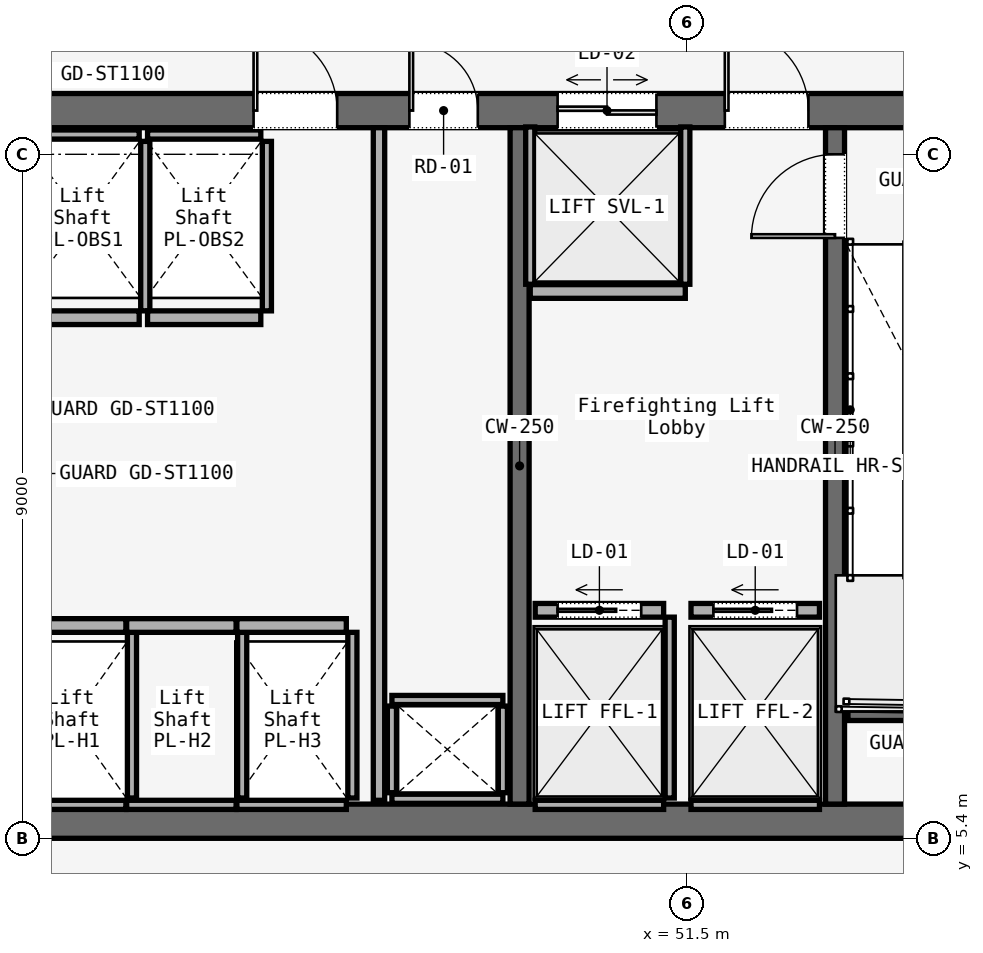
"""IFC4 building model, lengths in metres.
Left out: names, types, materials, properties, quantities, classifications, styles, units other than length and angle.
Written with IfcOpenShell. Run it as: python <this file> out.ifc"""

import sys

from ifc_helpers import new_model, si_unit, direction, frame, frame_2d, origin, place, context, subcontext, project, spatial, rectangle, extrude, element, fill, save


model = new_model("IFC4")
c1 = context("Model", 3, precision=1e-05, world=origin(), true_north=direction((0.0, 1.0)))
c2 = subcontext(c1, "Body", "Model", "MODEL_VIEW")
j1 = project(units=[si_unit("LENGTHUNIT", "METRE"), si_unit("PLANEANGLEUNIT", "RADIAN")], contexts=[c1])
p1 = place(None, origin())
s1 = spatial("IfcSite", under=j1, at=p1, CompositionType="ELEMENT")
p2 = place(p1, origin())
s2 = spatial("IfcBuilding", under=s1, at=p2, CompositionType="ELEMENT")
p3 = place(p2, frame((0.0, 0.0, 6.0)))
s3 = spatial("IfcBuildingStorey", under=s2, at=p3, CompositionType="ELEMENT", Elevation=6.0)
p4 = place(p3, frame((26.45, 14.975, 0.0), z_axis=(0.0, 0.0, 1.0), x_axis=(1.0, 0.0, 0.0)))
e1 = element("IfcWall", 1, at=p4, inside=s3, PredefinedType="SOLIDWALL", context=c2, shape_type="SweptSolid", body=[
    extrude(rectangle(XDim=31.1, YDim=0.45, at=frame_2d((15.55, 0.0))), origin(), (0.0, 0.0, 1.0), 5.7),
])
p5 = place(p4, frame((1.65, 0.0, 0.0)))
e2 = element("IfcOpeningElement", 2, at=p5, cuts=e1, PredefinedType="OPENING", context=c2, shape_type="SweptSolid", body=[
    extrude(rectangle(XDim=1.1, YDim=2.2, at=frame_2d((0.55, 1.1))), frame((0.0, 0.225, 0.0), z_axis=(0.0, -1.0, 0.0), x_axis=(1.0, 0.0, 0.0)), (0.0, 0.0, 1.0), 0.45),
])
p6 = place(p4, frame((13.65, 0.0, 0.0)))
e3 = element("IfcOpeningElement", 3, at=p6, cuts=e1, PredefinedType="OPENING", context=c2, shape_type="SweptSolid", body=[
    extrude(rectangle(XDim=1.1, YDim=2.2, at=frame_2d((0.55, 1.1))), frame((0.0, 0.225, 0.0), z_axis=(0.0, -1.0, 0.0), x_axis=(1.0, 0.0, 0.0)), (0.0, 0.0, 1.0), 0.45),
])
p7 = place(p4, frame((25.55, 0.0, 0.0)))
e4 = element("IfcOpeningElement", 4, at=p7, cuts=e1, PredefinedType="OPENING", context=c2, shape_type="SweptSolid", body=[
    extrude(rectangle(XDim=1.1, YDim=2.2, at=frame_2d((0.55, 1.1))), frame((0.0, 0.225, 0.0), z_axis=(0.0, -1.0, 0.0), x_axis=(1.0, 0.0, 0.0)), (0.0, 0.0, 1.0), 0.45),
])
p8 = place(p4, frame((10.7, 0.0, 0.0)))
e5 = element("IfcOpeningElement", 5, at=p8, cuts=e1, PredefinedType="OPENING", context=c2, shape_type="SweptSolid", body=[
    extrude(rectangle(XDim=1.4, YDim=2.2, at=frame_2d((0.7, 1.1))), frame((0.0, 0.225, 0.0), z_axis=(0.0, -1.0, 0.0), x_axis=(1.0, 0.0, 0.0)), (0.0, 0.0, 1.0), 0.45),
])
p9 = place(p4, frame((19.35, 0.0, 0.0)))
e6 = element("IfcOpeningElement", 6, at=p9, cuts=e1, PredefinedType="OPENING", context=c2, shape_type="SweptSolid", body=[
    extrude(rectangle(XDim=1.1, YDim=2.2, at=frame_2d((0.55, 1.1))), frame((0.0, 0.225, 0.0), z_axis=(0.0, -1.0, 0.0), x_axis=(1.0, 0.0, 0.0)), (0.0, 0.0, 1.0), 0.45),
])
p10 = place(p4, frame((21.4, 0.0, 0.0)))
e7 = element("IfcOpeningElement", 7, at=p10, cuts=e1, PredefinedType="OPENING", context=c2, shape_type="SweptSolid", body=[
    extrude(rectangle(XDim=0.9, YDim=2.1, at=frame_2d((0.45, 1.05))), frame((0.0, 0.225, 0.0), z_axis=(0.0, -1.0, 0.0), x_axis=(1.0, 0.0, 0.0)), (0.0, 0.0, 1.0), 0.45),
])
p11 = place(p4, frame((23.35, 0.0, 0.0)))
e8 = element("IfcOpeningElement", 8, at=p11, cuts=e1, PredefinedType="OPENING", context=c2, shape_type="SweptSolid", body=[
    extrude(rectangle(XDim=1.3, YDim=2.3, at=frame_2d((0.65, 1.15))), frame((0.0, 0.225, 0.0), z_axis=(0.0, -1.0, 0.0), x_axis=(1.0, 0.0, 0.0)), (0.0, 0.0, 1.0), 0.45),
])
p12 = place(p3, frame((26.45, 5.625, 0.0), z_axis=(0.0, 0.0, 1.0), x_axis=(1.0, 0.0, 0.0)))
e9 = element("IfcWall", 9, at=p12, inside=s3, PredefinedType="SOLIDWALL", context=c2, shape_type="SweptSolid", body=[
    extrude(rectangle(XDim=31.1, YDim=0.45, at=frame_2d((15.55, 0.0))), origin(), (0.0, 0.0, 1.0), 5.7),
])
p13 = place(p3, frame((49.3, 5.85, 0.0), z_axis=(0.0, 0.0, 1.0), x_axis=(0.0, 1.0, 0.0)))
e10 = element("IfcWall", 10, at=p13, inside=s3, PredefinedType="SOLIDWALL", context=c2, shape_type="SweptSolid", body=[
    extrude(rectangle(XDim=8.9, YDim=0.25, at=frame_2d((4.45, 0.0))), origin(), (0.0, 0.0, 1.0), 5.7),
])
p14 = place(p3, frame((53.45, 5.85, 0.0), z_axis=(0.0, 0.0, 1.0), x_axis=(0.0, 1.0, 0.0)))
e11 = element("IfcWall", 11, at=p14, inside=s3, PredefinedType="SOLIDWALL", context=c2, shape_type="SweptSolid", body=[
    extrude(rectangle(XDim=8.9, YDim=0.25, at=frame_2d((4.45, 0.0))), origin(), (0.0, 0.0, 1.0), 5.7),
])
p15 = place(p14, frame((7.45, 0.0, 0.0)))
e12 = element("IfcOpeningElement", 12, at=p15, cuts=e11, PredefinedType="OPENING", context=c2, shape_type="SweptSolid", body=[
    extrude(rectangle(XDim=1.1, YDim=2.2, at=frame_2d((0.55, 1.1))), frame((0.0, 0.125, 0.0), z_axis=(0.0, -1.0, 0.0), x_axis=(1.0, 0.0, 0.0)), (0.0, 0.0, 1.0), 0.25),
])
p16 = place(p3, frame((53.62, 7.05, 0.0), z_axis=(0.0, 0.0, 1.0), x_axis=(1.0, 0.0, 0.0)))
e13 = element("IfcWall", 13, at=p16, inside=s3, PredefinedType="SOLIDWALL", context=c2, shape_type="SweptSolid", body=[
    extrude(rectangle(XDim=3.115, YDim=0.2, at=frame_2d((1.558, 0.0))), origin(), (0.0, 0.0, 1.0), 6.0),
])
for number, where, z_axis, x_axis in (
    (14, (47.62, 5.92, 0.0), (0.0, 0.0, 1.0), (1.0, 0.0, 0.0)),
    (15, (47.62, 7.22, 0.0), (0.0, 0.0, 1.0), (1.0, 0.0, 0.0)),
):
    element("IfcWall", number, at=place(p3, frame(where, z_axis=z_axis, x_axis=x_axis)), inside=s3, PredefinedType="SOLIDWALL", context=c2, shape_type="SweptSolid", body=[
        extrude(rectangle(XDim=1.46, YDim=0.12, at=frame_2d((0.73, 0.0))), origin(), (0.0, 0.0, 1.0), 4.819),
    ])
for number, where, z_axis, x_axis in (
    (16, (47.62, 6.0, 0.0), (0.0, 0.0, 1.0), (0.0, 1.0, 0.0)),
    (17, (49.08, 6.0, 0.0), (0.0, 0.0, 1.0), (0.0, 1.0, 0.0)),
):
    element("IfcWall", number, at=place(p3, frame(where, z_axis=z_axis, x_axis=x_axis)), inside=s3, PredefinedType="SOLIDWALL", context=c2, shape_type="SweptSolid", body=[
        extrude(rectangle(XDim=1.14, YDim=0.12, at=frame_2d((0.57, 0.0))), origin(), (0.0, 0.0, 1.0), 4.819),
    ])
p17 = place(p3, frame((47.45, 5.9, 0.0), z_axis=(0.0, 0.0, 1.0), x_axis=(0.0, 1.0, 0.0)))
e18 = element("IfcWall", 18, at=p17, inside=s3, PredefinedType="PARTITIONING", context=c2, shape_type="SweptSolid", body=[
    extrude(rectangle(XDim=8.85, YDim=0.15, at=frame_2d((4.425, 0.0))), origin(), (0.0, 0.0, 1.0), 4.819),
])
p18 = place(p3, frame((42.78, 8.2, 0.0), z_axis=(0.0, 0.0, 1.0), x_axis=(1.0, 0.0, 0.0)))
e19 = element("IfcWall", 19, at=p18, inside=s3, PredefinedType="SOLIDWALL", context=c2, shape_type="SweptSolid", body=[
    extrude(rectangle(XDim=1.34, YDim=0.18, at=frame_2d((0.67, 0.0))), origin(), (0.0, 0.0, 1.0), 4.819),
])
p19 = place(p3, frame((42.78, 5.84, 0.0), z_axis=(0.0, 0.0, 1.0), x_axis=(1.0, 0.0, 0.0)))
e20 = element("IfcWall", 20, at=p19, inside=s3, PredefinedType="SOLIDWALL", context=c2, shape_type="SweptSolid", body=[
    extrude(rectangle(XDim=1.34, YDim=0.12, at=frame_2d((0.67, 0.0))), origin(), (0.0, 0.0, 1.0), 4.819),
])
p20 = place(p3, frame((44.2, 5.93, 0.0), z_axis=(0.0, 0.0, 1.0), x_axis=(0.0, 1.0, 0.0)))
e21 = element("IfcWall", 21, at=p20, inside=s3, PredefinedType="SOLIDWALL", context=c2, shape_type="SweptSolid", body=[
    extrude(rectangle(XDim=2.18, YDim=0.12, at=frame_2d((1.09, 0.0))), origin(), (0.0, 0.0, 1.0), 4.819),
])
p21 = place(p3, frame((44.13, 8.2, 0.0), z_axis=(0.0, 0.0, 1.0), x_axis=(1.0, 0.0, 0.0)))
e22 = element("IfcWall", 22, at=p21, inside=s3, PredefinedType="SOLIDWALL", context=c2, shape_type="SweptSolid", body=[
    extrude(rectangle(XDim=1.44, YDim=0.18, at=frame_2d((0.72, 0.0))), origin(), (0.0, 0.0, 1.0), 4.819),
])
p22 = place(p3, frame((44.13, 5.84, 0.0), z_axis=(0.0, 0.0, 1.0), x_axis=(1.0, 0.0, 0.0)))
e23 = element("IfcWall", 23, at=p22, inside=s3, PredefinedType="SOLIDWALL", context=c2, shape_type="SweptSolid", body=[
    extrude(rectangle(XDim=1.44, YDim=0.12, at=frame_2d((0.72, 0.0))), origin(), (0.0, 0.0, 1.0), 4.819),
])
p23 = place(p3, frame((45.65, 5.93, 0.0), z_axis=(0.0, 0.0, 1.0), x_axis=(0.0, 1.0, 0.0)))
e24 = element("IfcWall", 24, at=p23, inside=s3, PredefinedType="SOLIDWALL", context=c2, shape_type="SweptSolid", body=[
    extrude(rectangle(XDim=2.18, YDim=0.12, at=frame_2d((1.09, 0.0))), origin(), (0.0, 0.0, 1.0), 4.819),
])
p24 = place(p3, frame((45.58, 8.2, 0.0), z_axis=(0.0, 0.0, 1.0), x_axis=(1.0, 0.0, 0.0)))
e25 = element("IfcWall", 25, at=p24, inside=s3, PredefinedType="SOLIDWALL", context=c2, shape_type="SweptSolid", body=[
    extrude(rectangle(XDim=1.44, YDim=0.18, at=frame_2d((0.72, 0.0))), origin(), (0.0, 0.0, 1.0), 4.819),
])
p25 = place(p3, frame((45.58, 5.84, 0.0), z_axis=(0.0, 0.0, 1.0), x_axis=(1.0, 0.0, 0.0)))
e26 = element("IfcWall", 26, at=p25, inside=s3, PredefinedType="SOLIDWALL", context=c2, shape_type="SweptSolid", body=[
    extrude(rectangle(XDim=1.44, YDim=0.12, at=frame_2d((0.72, 0.0))), origin(), (0.0, 0.0, 1.0), 4.819),
])
p26 = place(p3, frame((47.1, 5.93, 0.0), z_axis=(0.0, 0.0, 1.0), x_axis=(0.0, 1.0, 0.0)))
e27 = element("IfcWall", 27, at=p26, inside=s3, PredefinedType="SOLIDWALL", context=c2, shape_type="SweptSolid", body=[
    extrude(rectangle(XDim=2.18, YDim=0.12, at=frame_2d((1.09, 0.0))), origin(), (0.0, 0.0, 1.0), 4.819),
])
p27 = place(p3, frame((42.805, 12.25, 0.0), z_axis=(0.0, 0.0, 1.0), x_axis=(1.0, 0.0, 0.0)))
e28 = element("IfcWall", 28, at=p27, inside=s3, PredefinedType="SOLIDWALL", context=c2, shape_type="SweptSolid", body=[
    extrude(rectangle(XDim=1.49, YDim=0.18, at=frame_2d((0.745, 0.0))), origin(), (0.0, 0.0, 1.0), 4.819),
])
p28 = place(p3, frame((42.805, 14.66, 0.0), z_axis=(0.0, 0.0, 1.0), x_axis=(1.0, 0.0, 0.0)))
e29 = element("IfcWall", 29, at=p28, inside=s3, PredefinedType="SOLIDWALL", context=c2, shape_type="SweptSolid", body=[
    extrude(rectangle(XDim=1.49, YDim=0.12, at=frame_2d((0.745, 0.0))), origin(), (0.0, 0.0, 1.0), 4.819),
])
p29 = place(p3, frame((44.375, 12.34, 0.0), z_axis=(0.0, 0.0, 1.0), x_axis=(0.0, 1.0, 0.0)))
e30 = element("IfcWall", 30, at=p29, inside=s3, PredefinedType="SOLIDWALL", context=c2, shape_type="SweptSolid", body=[
    extrude(rectangle(XDim=2.23, YDim=0.12, at=frame_2d((1.115, 0.0))), origin(), (0.0, 0.0, 1.0), 4.819),
])
p30 = place(p3, frame((44.405, 12.25, 0.0), z_axis=(0.0, 0.0, 1.0), x_axis=(1.0, 0.0, 0.0)))
e31 = element("IfcWall", 31, at=p30, inside=s3, PredefinedType="SOLIDWALL", context=c2, shape_type="SweptSolid", body=[
    extrude(rectangle(XDim=1.49, YDim=0.18, at=frame_2d((0.745, 0.0))), origin(), (0.0, 0.0, 1.0), 4.819),
])
p31 = place(p3, frame((44.405, 14.66, 0.0), z_axis=(0.0, 0.0, 1.0), x_axis=(1.0, 0.0, 0.0)))
e32 = element("IfcWall", 32, at=p31, inside=s3, PredefinedType="SOLIDWALL", context=c2, shape_type="SweptSolid", body=[
    extrude(rectangle(XDim=1.49, YDim=0.12, at=frame_2d((0.745, 0.0))), origin(), (0.0, 0.0, 1.0), 4.819),
])
p32 = place(p3, frame((45.975, 12.34, 0.0), z_axis=(0.0, 0.0, 1.0), x_axis=(0.0, 1.0, 0.0)))
e33 = element("IfcWall", 33, at=p32, inside=s3, PredefinedType="SOLIDWALL", context=c2, shape_type="SweptSolid", body=[
    extrude(rectangle(XDim=2.23, YDim=0.12, at=frame_2d((1.115, 0.0))), origin(), (0.0, 0.0, 1.0), 4.819),
])
p33 = place(p3, frame((49.505, 8.4, 0.0), z_axis=(0.0, 0.0, 1.0), x_axis=(1.0, 0.0, 0.0)))
e34 = element("IfcWall", 34, at=p33, inside=s3, PredefinedType="SOLIDWALL", context=c2, shape_type="SweptSolid", body=[
    extrude(rectangle(XDim=1.69, YDim=0.18, at=frame_2d((0.845, 0.0))), origin(), (0.0, 0.0, 1.0), 4.819),
])
p34 = place(p33, frame((0.295, 0.0, 0.0)))
e35 = element("IfcOpeningElement", 35, at=p34, cuts=e34, PredefinedType="OPENING", context=c2, shape_type="SweptSolid", body=[
    extrude(rectangle(XDim=1.1, YDim=2.2, at=frame_2d((0.55, 1.1))), frame((0.0, 0.09, 0.0), z_axis=(0.0, -1.0, 0.0), x_axis=(1.0, 0.0, 0.0)), (0.0, 0.0, 1.0), 0.18),
])
p35 = place(p3, frame((49.505, 5.84, 0.0), z_axis=(0.0, 0.0, 1.0), x_axis=(1.0, 0.0, 0.0)))
e36 = element("IfcWall", 36, at=p35, inside=s3, PredefinedType="SOLIDWALL", context=c2, shape_type="SweptSolid", body=[
    extrude(rectangle(XDim=1.69, YDim=0.12, at=frame_2d((0.845, 0.0))), origin(), (0.0, 0.0, 1.0), 4.819),
])
p36 = place(p3, frame((51.275, 5.93, 0.0), z_axis=(0.0, 0.0, 1.0), x_axis=(0.0, 1.0, 0.0)))
e37 = element("IfcWall", 37, at=p36, inside=s3, PredefinedType="SOLIDWALL", context=c2, shape_type="SweptSolid", body=[
    extrude(rectangle(XDim=2.38, YDim=0.12, at=frame_2d((1.19, 0.0))), origin(), (0.0, 0.0, 1.0), 4.819),
])
p37 = place(p3, frame((51.555, 8.4, 0.0), z_axis=(0.0, 0.0, 1.0), x_axis=(1.0, 0.0, 0.0)))
e38 = element("IfcWall", 38, at=p37, inside=s3, PredefinedType="SOLIDWALL", context=c2, shape_type="SweptSolid", body=[
    extrude(rectangle(XDim=1.69, YDim=0.18, at=frame_2d((0.845, 0.0))), origin(), (0.0, 0.0, 1.0), 4.819),
])
p38 = place(p37, frame((0.295, 0.0, 0.0)))
e39 = element("IfcOpeningElement", 39, at=p38, cuts=e38, PredefinedType="OPENING", context=c2, shape_type="SweptSolid", body=[
    extrude(rectangle(XDim=1.1, YDim=2.2, at=frame_2d((0.55, 1.1))), frame((0.0, 0.09, 0.0), z_axis=(0.0, -1.0, 0.0), x_axis=(1.0, 0.0, 0.0)), (0.0, 0.0, 1.0), 0.18),
])
p39 = place(p3, frame((51.555, 5.84, 0.0), z_axis=(0.0, 0.0, 1.0), x_axis=(1.0, 0.0, 0.0)))
e40 = element("IfcWall", 40, at=p39, inside=s3, PredefinedType="SOLIDWALL", context=c2, shape_type="SweptSolid", body=[
    extrude(rectangle(XDim=1.69, YDim=0.12, at=frame_2d((0.845, 0.0))), origin(), (0.0, 0.0, 1.0), 4.819),
])
p40 = place(p3, frame((49.44, 12.595, 0.0), z_axis=(0.0, 0.0, 1.0), x_axis=(1.0, 0.0, 0.0)))
e41 = element("IfcWall", 41, at=p40, inside=s3, PredefinedType="SOLIDWALL", context=c2, shape_type="SweptSolid", body=[
    extrude(rectangle(XDim=2.04, YDim=0.18, at=frame_2d((1.02, 0.0))), origin(), (0.0, 0.0, 1.0), 4.819),
])
for number, where, z_axis, x_axis in (
    (42, (49.44, 12.69, 0.0), (0.0, 0.0, 1.0), (0.0, 1.0, 0.0)),
    (43, (51.48, 12.69, 0.0), (0.0, 0.0, 1.0), (0.0, 1.0, 0.0)),
):
    element("IfcWall", number, at=place(p3, frame(where, z_axis=z_axis, x_axis=x_axis)), inside=s3, PredefinedType="SOLIDWALL", context=c2, shape_type="SweptSolid", body=[
        extrude(rectangle(XDim=2.07, YDim=0.12, at=frame_2d((1.035, 0.0))), origin(), (0.0, 0.0, 1.0), 4.819),
    ])
p41 = place(p7, origin())
e44 = element("IfcDoor", 44, at=p41, inside=s3, OperationType="SINGLE_SWING_RIGHT", PredefinedType="DOOR", context=c2, shape_type="SweptSolid", body=[
    extrude(rectangle(XDim=1.1, YDim=2.2, at=frame_2d((0.55, 1.1))), frame((0.0, 0.025, 0.0), z_axis=(0.0, -1.0, 0.0), x_axis=(1.0, 0.0, 0.0)), (0.0, 0.0, 1.0), 0.05),
])
fill(e4, e44)
p42 = place(p9, origin())
e45 = element("IfcDoor", 45, at=p42, inside=s3, OperationType="SINGLE_SWING_LEFT", PredefinedType="DOOR", context=c2, shape_type="SweptSolid", body=[
    extrude(rectangle(XDim=1.1, YDim=2.2, at=frame_2d((0.55, 1.1))), frame((0.0, 0.025, 0.0), z_axis=(0.0, -1.0, 0.0), x_axis=(1.0, 0.0, 0.0)), (0.0, 0.0, 1.0), 0.05),
])
fill(e6, e45)
p43 = place(p10, origin())
e46 = element("IfcDoor", 46, at=p43, inside=s3, OperationType="SINGLE_SWING_LEFT", PredefinedType="DOOR", context=c2, shape_type="SweptSolid", body=[
    extrude(rectangle(XDim=0.9, YDim=2.1, at=frame_2d((0.45, 1.05))), frame((0.0, 0.025, 0.0), z_axis=(0.0, -1.0, 0.0), x_axis=(1.0, 0.0, 0.0)), (0.0, 0.0, 1.0), 0.05),
])
fill(e7, e46)
p44 = place(p15, origin())
e47 = element("IfcDoor", 47, at=p44, inside=s3, OperationType="SINGLE_SWING_LEFT", PredefinedType="DOOR", context=c2, shape_type="SweptSolid", body=[
    extrude(rectangle(XDim=1.1, YDim=2.2, at=frame_2d((0.55, 1.1))), frame((0.0, 0.025, 0.0), z_axis=(0.0, -1.0, 0.0), x_axis=(1.0, 0.0, 0.0)), (0.0, 0.0, 1.0), 0.05),
])
fill(e12, e47)
p45 = place(p34, origin())
e48 = element("IfcDoor", 48, at=p45, inside=s3, OperationType="SLIDING_TO_LEFT", PredefinedType="DOOR", context=c2, shape_type="SweptSolid", body=[
    extrude(rectangle(XDim=1.1, YDim=2.2, at=frame_2d((0.55, 1.1))), frame((0.0, 0.025, 0.0), z_axis=(0.0, -1.0, 0.0), x_axis=(1.0, 0.0, 0.0)), (0.0, 0.0, 1.0), 0.05),
])
fill(e35, e48)
p46 = place(p38, origin())
e49 = element("IfcDoor", 49, at=p46, inside=s3, OperationType="SLIDING_TO_LEFT", PredefinedType="DOOR", context=c2, shape_type="SweptSolid", body=[
    extrude(rectangle(XDim=1.1, YDim=2.2, at=frame_2d((0.55, 1.1))), frame((0.0, 0.025, 0.0), z_axis=(0.0, -1.0, 0.0), x_axis=(1.0, 0.0, 0.0)), (0.0, 0.0, 1.0), 0.05),
])
fill(e39, e49)
p47 = place(p11, origin())
e50 = element("IfcDoor", 50, at=p47, inside=s3, OperationType="DOUBLE_DOOR_SLIDING", PredefinedType="DOOR", context=c2, shape_type="SweptSolid", body=[
    extrude(rectangle(XDim=1.3, YDim=2.3, at=frame_2d((0.65, 1.15))), frame((0.0, 0.025, 0.0), z_axis=(0.0, -1.0, 0.0), x_axis=(1.0, 0.0, 0.0)), (0.0, 0.0, 1.0), 0.05),
])
fill(e8, e50)
save(model, sys.argv[1])
